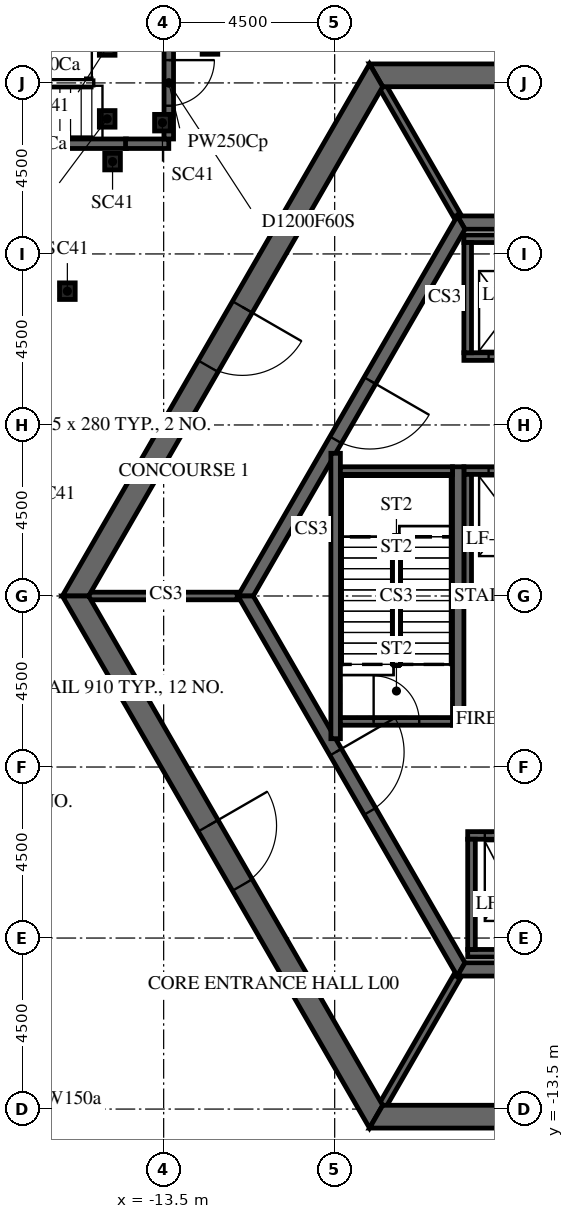
"""IFC4 building model, lengths in metres.
Left out: names, types, materials, properties, quantities, classifications, styles, units other than length and angle.
Written with IfcOpenShell. Run it as: python <this file> out.ifc"""

import sys

from ifc_helpers import new_model, si_unit, direction, frame, frame_2d, origin, origin_2d, place, context, subcontext, project, spatial, polyline, rectangle, i_section, outline, extrude, element, fill, save


model = new_model("IFC4")
c1 = context("Model", 3, precision=1e-05, world=origin(), true_north=direction((0.0, 1.0)))
c2 = subcontext(c1, "Body", "Model", "MODEL_VIEW")
j1 = project(units=[si_unit("LENGTHUNIT", "METRE"), si_unit("PLANEANGLEUNIT", "RADIAN")], contexts=[c1])
p1 = place(None, origin())
s1 = spatial("IfcSite", under=j1, at=p1, CompositionType="ELEMENT")
p2 = place(p1, origin())
s2 = spatial("IfcBuilding", under=s1, at=p2, CompositionType="ELEMENT")
p3 = place(p2, origin())
s3 = spatial("IfcBuildingStorey", under=s2, at=p3, CompositionType="ELEMENT", Elevation=0.0)
for number, where, z_axis, x_axis in (
    (1, (-16.034, 8.021, -2.1), (0.0, 0.0, 1.0), (1.0, 0.0, 0.0)),
    (2, (-12.282, 14.473, -2.1), (0.0, 0.0, 1.0), (1.0, 0.0, 0.0)),
    (3, (-14.986, 14.446, -2.1), (0.0, 0.0, 1.0), (1.0, 0.0, 0.0)),
    (4, (-14.986, 12.554, -2.1), (0.0, 0.0, 1.0), (1.0, 0.0, 0.0)),
    (5, (-13.532, 12.454, -2.1), (0.0, 0.0, 1.0), (1.0, 0.0, 0.0)),
    (6, (-14.845, 11.43, -2.1), (0.0, 0.0, 1.0), (1.0, 0.0, 0.0)),
):
    element("IfcColumn", number, at=place(p3, frame(where, z_axis=z_axis, x_axis=x_axis)), inside=s3, PredefinedType="COLUMN", context=c2, shape_type="SweptSolid", body=[
        extrude(i_section(OverallWidth=0.412, OverallDepth=0.437, WebThickness=0.036, FlangeThickness=0.058, FilletRadius=0.015, at=origin_2d()), origin(), (0.0, 0.0, 1.0), 10.85),
    ])
p4 = place(p3, frame((-7.91, 13.7, -2.1), z_axis=(0.0, 0.0, 1.0), x_axis=(-0.499999880136, -0.866025472988, 0.0)))
e7 = element("IfcWall", 7, at=p4, inside=s3, PredefinedType="SHEAR", context=c2, shape_type="SweptSolid", body=[
    extrude(outline(polyline([(-0.173, -0.3), (15.993, -0.3), (15.646, 0.3), (0.173, 0.3), (-0.173, -0.3)])), origin(), (0.0, 0.0, 1.0), 10.85),
])
p5 = place(p4, frame((7.039, 0.0, 2.1)))
e8 = element("IfcOpeningElement", 8, at=p5, cuts=e7, PredefinedType="OPENING", context=c2, shape_type="SweptSolid", body=[
    extrude(rectangle(XDim=1.8, YDim=2.4, at=frame_2d((0.9, 1.2))), frame((0.0, 0.31, 0.0), z_axis=(0.0, -1.0, 0.0), x_axis=(1.0, 0.0, 0.0)), (0.0, 0.0, 1.0), 0.62),
])
p6 = place(p3, frame((-15.819, 0.0, -2.1), z_axis=(0.0, 0.0, 1.0), x_axis=(0.499999880136, -0.866025472988, 0.0)))
e9 = element("IfcWall", 9, at=p6, inside=s3, PredefinedType="SHEAR", context=c2, shape_type="SweptSolid", body=[
    extrude(outline(polyline([(-0.173, -0.3), (15.993, -0.3), (15.646, 0.3), (0.173, 0.3), (-0.173, -0.3)])), origin(), (0.0, 0.0, 1.0), 10.85),
])
p7 = place(p6, frame((6.981, 0.0, 2.1)))
e10 = element("IfcOpeningElement", 10, at=p7, cuts=e9, PredefinedType="OPENING", context=c2, shape_type="SweptSolid", body=[
    extrude(rectangle(XDim=1.8, YDim=2.4, at=frame_2d((0.9, 1.2))), frame((0.0, 0.31, 0.0), z_axis=(0.0, -1.0, 0.0), x_axis=(1.0, 0.0, 0.0)), (0.0, 0.0, 1.0), 0.62),
])
p8 = place(p3, frame((-7.91, -13.7, -2.1), z_axis=(0.0, 0.0, 1.0), x_axis=(1.0, 0.0, 0.0)))
e11 = element("IfcWall", 11, at=p8, inside=s3, PredefinedType="SHEAR", context=c2, shape_type="SweptSolid", body=[
    extrude(outline(polyline([(-0.173, -0.3), (15.993, -0.3), (15.646, 0.3), (0.173, 0.3), (-0.173, -0.3)])), origin(), (0.0, 0.0, 1.0), 10.85),
])
p9 = place(p8, frame((7.31, 0.0, 2.1)))
e12 = element("IfcOpeningElement", 12, at=p9, cuts=e11, PredefinedType="OPENING", context=c2, shape_type="SweptSolid", body=[
    extrude(rectangle(XDim=1.2, YDim=2.4, at=frame_2d((0.6, 1.2))), frame((0.0, 0.31, 0.0), z_axis=(0.0, -1.0, 0.0), x_axis=(1.0, 0.0, 0.0)), (0.0, 0.0, 1.0), 0.62),
])
p10 = place(p3, frame((7.91, 13.7, -2.1), z_axis=(0.0, 0.0, 1.0), x_axis=(-1.0, 0.0, 0.0)))
e13 = element("IfcWall", 13, at=p10, inside=s3, PredefinedType="SHEAR", context=c2, shape_type="SweptSolid", body=[
    extrude(outline(polyline([(-0.173, -0.3), (15.993, -0.3), (15.646, 0.3), (0.173, 0.3), (-0.173, -0.3)])), origin(), (0.0, 0.0, 1.0), 10.85),
])
p11 = place(p10, frame((7.31, 0.0, 2.1)))
e14 = element("IfcOpeningElement", 14, at=p11, cuts=e13, PredefinedType="OPENING", context=c2, shape_type="SweptSolid", body=[
    extrude(rectangle(XDim=1.2, YDim=2.4, at=frame_2d((0.6, 1.2))), frame((0.0, 0.31, 0.0), z_axis=(0.0, -1.0, 0.0), x_axis=(1.0, 0.0, 0.0)), (0.0, 0.0, 1.0), 0.62),
])
p12 = place(p3, frame((-5.673, 9.825, -2.1), z_axis=(0.0, 0.0, 1.0), x_axis=(-0.499995046907, -0.866028263435, 0.0)))
e15 = element("IfcWall", 15, at=p12, inside=s3, PredefinedType="SHEAR", context=c2, shape_type="SweptSolid", body=[
    extrude(outline(polyline([(-0.101, -0.175), (11.446, -0.175), (11.244, 0.175), (0.101, 0.175), (-0.101, -0.175)])), origin(), (0.0, 0.0, 1.0), 10.85),
])
p13 = place(p12, frame((4.801, 0.0, 2.1)))
e16 = element("IfcOpeningElement", 16, at=p13, cuts=e15, PredefinedType="OPENING", context=c2, shape_type="SweptSolid", body=[
    extrude(rectangle(XDim=1.8, YDim=2.4, at=frame_2d((0.9, 1.2))), frame((0.0, 0.185, 0.0), z_axis=(0.0, -1.0, 0.0), x_axis=(1.0, 0.0, 0.0)), (0.0, 0.0, 1.0), 0.37),
])
p14 = place(p3, frame((-11.345, 0.0, -2.1), z_axis=(0.0, 0.0, 1.0), x_axis=(0.499995046907, -0.866028263435, 0.0)))
e17 = element("IfcWall", 17, at=p14, inside=s3, PredefinedType="SHEAR", context=c2, shape_type="SweptSolid", body=[
    extrude(outline(polyline([(-0.101, -0.175), (11.446, -0.175), (11.244, 0.175), (0.101, 0.175), (-0.101, -0.175)])), origin(), (0.0, 0.0, 1.0), 10.85),
])
p15 = place(p14, frame((4.744, 0.0, 2.1)))
e18 = element("IfcOpeningElement", 18, at=p15, cuts=e17, PredefinedType="OPENING", context=c2, shape_type="SweptSolid", body=[
    extrude(rectangle(XDim=1.8, YDim=2.4, at=frame_2d((0.9, 1.2))), frame((0.0, 0.185, 0.0), z_axis=(0.0, -1.0, 0.0), x_axis=(1.0, 0.0, 0.0)), (0.0, 0.0, 1.0), 0.37),
])
for number, where, z_axis, x_axis in (
    (19, (-5.673, -9.825, -2.1), (0.0, 0.0, 1.0), (1.0, 0.0, 0.0)),
    (20, (5.673, 9.825, -2.1), (0.0, 0.0, 1.0), (-1.0, 0.0, 0.0)),
):
    element("IfcWall", number, at=place(p3, frame(where, z_axis=z_axis, x_axis=x_axis)), inside=s3, PredefinedType="SHEAR", context=c2, shape_type="SweptSolid", body=[
        extrude(outline(polyline([(-0.101, -0.175), (11.446, -0.175), (11.244, 0.175), (0.101, 0.175), (-0.101, -0.175)])), origin(), (0.0, 0.0, 1.0), 10.85),
    ])
p16 = place(p3, frame((-5.6, 6.3, -2.1), z_axis=(0.0, 0.0, 1.0), x_axis=(1.0, 0.0, 0.0)))
e21 = element("IfcWall", 21, at=p16, inside=s3, PredefinedType="SHEAR", context=c2, shape_type="SweptSolid", body=[
    extrude(rectangle(XDim=11.2, YDim=0.2, at=frame_2d((5.6, 0.0))), origin(), (0.0, 0.0, 1.0), 10.85),
])
p17 = place(p16, frame((0.65, 0.0, 2.1)))
e22 = element("IfcOpeningElement", 22, at=p17, cuts=e21, PredefinedType="OPENING", context=c2, shape_type="SweptSolid", body=[
    extrude(rectangle(XDim=1.1, YDim=2.1, at=frame_2d((0.55, 1.05))), frame((0.0, 0.11, 0.0), z_axis=(0.0, -1.0, 0.0), x_axis=(1.0, 0.0, 0.0)), (0.0, 0.0, 1.0), 0.22),
])
p18 = place(p16, frame((2.85, 0.0, 2.1)))
e23 = element("IfcOpeningElement", 23, at=p18, cuts=e21, PredefinedType="OPENING", context=c2, shape_type="SweptSolid", body=[
    extrude(rectangle(XDim=1.1, YDim=2.1, at=frame_2d((0.55, 1.05))), frame((0.0, 0.11, 0.0), z_axis=(0.0, -1.0, 0.0), x_axis=(1.0, 0.0, 0.0)), (0.0, 0.0, 1.0), 0.22),
])
p19 = place(p16, frame((5.05, 0.0, 2.1)))
e24 = element("IfcOpeningElement", 24, at=p19, cuts=e21, PredefinedType="OPENING", context=c2, shape_type="SweptSolid", body=[
    extrude(rectangle(XDim=1.1, YDim=2.1, at=frame_2d((0.55, 1.05))), frame((0.0, 0.11, 0.0), z_axis=(0.0, -1.0, 0.0), x_axis=(1.0, 0.0, 0.0)), (0.0, 0.0, 1.0), 0.22),
])
p20 = place(p16, frame((7.25, 0.0, 2.1)))
e25 = element("IfcOpeningElement", 25, at=p20, cuts=e21, PredefinedType="OPENING", context=c2, shape_type="SweptSolid", body=[
    extrude(rectangle(XDim=1.1, YDim=2.1, at=frame_2d((0.55, 1.05))), frame((0.0, 0.11, 0.0), z_axis=(0.0, -1.0, 0.0), x_axis=(1.0, 0.0, 0.0)), (0.0, 0.0, 1.0), 0.22),
])
p21 = place(p16, frame((9.45, 0.0, 2.1)))
e26 = element("IfcOpeningElement", 26, at=p21, cuts=e21, PredefinedType="OPENING", context=c2, shape_type="SweptSolid", body=[
    extrude(rectangle(XDim=1.1, YDim=2.1, at=frame_2d((0.55, 1.05))), frame((0.0, 0.11, 0.0), z_axis=(0.0, -1.0, 0.0), x_axis=(1.0, 0.0, 0.0)), (0.0, 0.0, 1.0), 0.22),
])
p22 = place(p3, frame((-5.6, 9.4, -2.1), z_axis=(0.0, 0.0, 1.0), x_axis=(1.0, 0.0, 0.0)))
e27 = element("IfcWall", 27, at=p22, inside=s3, PredefinedType="SHEAR", context=c2, shape_type="SweptSolid", body=[
    extrude(rectangle(XDim=11.2, YDim=0.2, at=frame_2d((5.6, 0.0))), origin(), (0.0, 0.0, 1.0), 10.85),
])
p23 = place(p3, frame((-5.5, 6.4, -2.1), z_axis=(0.0, 0.0, 1.0), x_axis=(0.0, 1.0, 0.0)))
e28 = element("IfcWall", 28, at=p23, inside=s3, PredefinedType="SHEAR", context=c2, shape_type="SweptSolid", body=[
    extrude(rectangle(XDim=2.9, YDim=0.2, at=frame_2d((1.45, 0.0))), origin(), (0.0, 0.0, 1.0), 10.85),
])
p24 = place(p3, frame((-5.6, 3.3, -2.1), z_axis=(0.0, 0.0, 1.0), x_axis=(1.0, 0.0, 0.0)))
e29 = element("IfcWall", 29, at=p24, inside=s3, PredefinedType="SHEAR", context=c2, shape_type="SweptSolid", body=[
    extrude(rectangle(XDim=11.2, YDim=0.2, at=frame_2d((5.6, 0.0))), origin(), (0.0, 0.0, 1.0), 10.85),
])
p25 = place(p24, frame((0.65, 0.0, 2.1)))
e30 = element("IfcOpeningElement", 30, at=p25, cuts=e29, PredefinedType="OPENING", context=c2, shape_type="SweptSolid", body=[
    extrude(rectangle(XDim=1.1, YDim=2.1, at=frame_2d((0.55, 1.05))), frame((0.0, 0.11, 0.0), z_axis=(0.0, -1.0, 0.0), x_axis=(1.0, 0.0, 0.0)), (0.0, 0.0, 1.0), 0.22),
])
p26 = place(p24, frame((2.85, 0.0, 2.1)))
e31 = element("IfcOpeningElement", 31, at=p26, cuts=e29, PredefinedType="OPENING", context=c2, shape_type="SweptSolid", body=[
    extrude(rectangle(XDim=1.1, YDim=2.1, at=frame_2d((0.55, 1.05))), frame((0.0, 0.11, 0.0), z_axis=(0.0, -1.0, 0.0), x_axis=(1.0, 0.0, 0.0)), (0.0, 0.0, 1.0), 0.22),
])
p27 = place(p24, frame((5.05, 0.0, 2.1)))
e32 = element("IfcOpeningElement", 32, at=p27, cuts=e29, PredefinedType="OPENING", context=c2, shape_type="SweptSolid", body=[
    extrude(rectangle(XDim=1.1, YDim=2.1, at=frame_2d((0.55, 1.05))), frame((0.0, 0.11, 0.0), z_axis=(0.0, -1.0, 0.0), x_axis=(1.0, 0.0, 0.0)), (0.0, 0.0, 1.0), 0.22),
])
p28 = place(p24, frame((7.25, 0.0, 2.1)))
e33 = element("IfcOpeningElement", 33, at=p28, cuts=e29, PredefinedType="OPENING", context=c2, shape_type="SweptSolid", body=[
    extrude(rectangle(XDim=1.1, YDim=2.1, at=frame_2d((0.55, 1.05))), frame((0.0, 0.11, 0.0), z_axis=(0.0, -1.0, 0.0), x_axis=(1.0, 0.0, 0.0)), (0.0, 0.0, 1.0), 0.22),
])
p29 = place(p24, frame((9.45, 0.0, 2.1)))
e34 = element("IfcOpeningElement", 34, at=p29, cuts=e29, PredefinedType="OPENING", context=c2, shape_type="SweptSolid", body=[
    extrude(rectangle(XDim=1.1, YDim=2.1, at=frame_2d((0.55, 1.05))), frame((0.0, 0.11, 0.0), z_axis=(0.0, -1.0, 0.0), x_axis=(1.0, 0.0, 0.0)), (0.0, 0.0, 1.0), 0.22),
])
p30 = place(p3, frame((-5.6, 0.0, -2.1), z_axis=(0.0, 0.0, 1.0), x_axis=(1.0, 0.0, 0.0)))
e35 = element("IfcWall", 35, at=p30, inside=s3, PredefinedType="SHEAR", context=c2, shape_type="SweptSolid", body=[
    extrude(rectangle(XDim=11.2, YDim=0.2, at=frame_2d((5.6, 0.0))), origin(), (0.0, 0.0, 1.0), 10.85),
])
p31 = place(p3, frame((-5.5, 0.1, -2.1), z_axis=(0.0, 0.0, 1.0), x_axis=(0.0, 1.0, 0.0)))
e36 = element("IfcWall", 36, at=p31, inside=s3, PredefinedType="SHEAR", context=c2, shape_type="SweptSolid", body=[
    extrude(rectangle(XDim=3.1, YDim=0.2, at=frame_2d((1.55, 0.0))), origin(), (0.0, 0.0, 1.0), 10.85),
])
p32 = place(p3, frame((-5.5, -6.3, -2.1), z_axis=(0.0, 0.0, 1.0), x_axis=(1.0, 0.0, 0.0)))
e37 = element("IfcWall", 37, at=p32, inside=s3, PredefinedType="SHEAR", context=c2, shape_type="SweptSolid", body=[
    extrude(rectangle(XDim=9.2, YDim=0.2, at=frame_2d((4.6, 0.0))), origin(), (0.0, 0.0, 1.0), 10.85),
])
p33 = place(p32, frame((0.45, 0.0, 2.1)))
e38 = element("IfcOpeningElement", 38, at=p33, cuts=e37, PredefinedType="OPENING", context=c2, shape_type="SweptSolid", body=[
    extrude(rectangle(XDim=1.1, YDim=2.1, at=frame_2d((0.55, 1.05))), frame((0.0, 0.11, 0.0), z_axis=(0.0, -1.0, 0.0), x_axis=(1.0, 0.0, 0.0)), (0.0, 0.0, 1.0), 0.22),
])
p34 = place(p32, frame((2.25, 0.0, 2.1)))
e39 = element("IfcOpeningElement", 39, at=p34, cuts=e37, PredefinedType="OPENING", context=c2, shape_type="SweptSolid", body=[
    extrude(rectangle(XDim=1.1, YDim=2.1, at=frame_2d((0.55, 1.05))), frame((0.0, 0.11, 0.0), z_axis=(0.0, -1.0, 0.0), x_axis=(1.0, 0.0, 0.0)), (0.0, 0.0, 1.0), 0.22),
])
p35 = place(p32, frame((4.05, 0.0, 2.1)))
e40 = element("IfcOpeningElement", 40, at=p35, cuts=e37, PredefinedType="OPENING", context=c2, shape_type="SweptSolid", body=[
    extrude(rectangle(XDim=1.1, YDim=2.1, at=frame_2d((0.55, 1.05))), frame((0.0, 0.11, 0.0), z_axis=(0.0, -1.0, 0.0), x_axis=(1.0, 0.0, 0.0)), (0.0, 0.0, 1.0), 0.22),
])
p36 = place(p32, frame((5.85, 0.0, 2.1)))
e41 = element("IfcOpeningElement", 41, at=p36, cuts=e37, PredefinedType="OPENING", context=c2, shape_type="SweptSolid", body=[
    extrude(rectangle(XDim=1.1, YDim=2.1, at=frame_2d((0.55, 1.05))), frame((0.0, 0.11, 0.0), z_axis=(0.0, -1.0, 0.0), x_axis=(1.0, 0.0, 0.0)), (0.0, 0.0, 1.0), 0.22),
])
p37 = place(p32, frame((7.65, 0.0, 2.1)))
e42 = element("IfcOpeningElement", 42, at=p37, cuts=e37, PredefinedType="OPENING", context=c2, shape_type="SweptSolid", body=[
    extrude(rectangle(XDim=1.1, YDim=2.1, at=frame_2d((0.55, 1.05))), frame((0.0, 0.11, 0.0), z_axis=(0.0, -1.0, 0.0), x_axis=(1.0, 0.0, 0.0)), (0.0, 0.0, 1.0), 0.22),
])
p38 = place(p3, frame((-5.5, -9.4, -2.1), z_axis=(0.0, 0.0, 1.0), x_axis=(1.0, 0.0, 0.0)))
e43 = element("IfcWall", 43, at=p38, inside=s3, PredefinedType="SHEAR", context=c2, shape_type="SweptSolid", body=[
    extrude(rectangle(XDim=9.2, YDim=0.2, at=frame_2d((4.6, 0.0))), origin(), (0.0, 0.0, 1.0), 10.85),
])
p39 = place(p3, frame((-5.4, -9.3, -2.1), z_axis=(0.0, 0.0, 1.0), x_axis=(0.0, 1.0, 0.0)))
e44 = element("IfcWall", 44, at=p39, inside=s3, PredefinedType="SHEAR", context=c2, shape_type="SweptSolid", body=[
    extrude(rectangle(XDim=2.9, YDim=0.2, at=frame_2d((1.45, 0.0))), origin(), (0.0, 0.0, 1.0), 10.85),
])
p40 = place(p3, frame((-5.773, 10.0, -2.1), z_axis=(0.0, 0.0, 1.0), x_axis=(-0.500038251005, 0.86600331843, 0.0)))
e45 = element("IfcWall", 45, at=p40, inside=s3, PredefinedType="SHEAR", context=c2, shape_type="SweptSolid", body=[
    extrude(rectangle(XDim=3.926, YDim=0.2, at=frame_2d((1.963, 0.0))), origin(), (0.0, 0.0, 1.0), 10.85),
])
p41 = place(p3, frame((-11.547, 0.0, -2.1), z_axis=(0.0, 0.0, 1.0), x_axis=(-1.0, 0.0, 0.0)))
e46 = element("IfcWall", 46, at=p41, inside=s3, PredefinedType="SHEAR", context=c2, shape_type="SweptSolid", body=[
    extrude(rectangle(XDim=3.926, YDim=0.2, at=frame_2d((1.963, 0.0))), origin(), (0.0, 0.0, 1.0), 10.85),
])
p42 = place(p3, frame((-5.773, -10.0, -2.1), z_axis=(0.0, 0.0, 1.0), x_axis=(-0.500038251005, -0.86600331843, 0.0)))
e47 = element("IfcWall", 47, at=p42, inside=s3, PredefinedType="SHEAR", context=c2, shape_type="SweptSolid", body=[
    extrude(rectangle(XDim=3.926, YDim=0.2, at=frame_2d((1.963, 0.0))), origin(), (0.0, 0.0, 1.0), 10.85),
])
p43 = place(p3, frame((-5.75, -3.4, -2.1), z_axis=(0.0, 0.0, 1.0), x_axis=(0.0, 1.0, 0.0)))
e48 = element("IfcWall", 48, at=p43, inside=s3, PredefinedType="SHEAR", context=c2, shape_type="SweptSolid", body=[
    extrude(rectangle(XDim=6.8, YDim=0.3, at=frame_2d((3.4, 0.0))), origin(), (0.0, 0.0, 1.0), 10.85),
])
p44 = place(p3, frame((-8.975, -3.755, -2.1), z_axis=(0.0, 0.0, 1.0), x_axis=(0.0, 1.0, 0.0)))
e49 = element("IfcWall", 49, at=p44, inside=s3, PredefinedType="SHEAR", context=c2, shape_type="SweptSolid", body=[
    extrude(rectangle(XDim=7.51, YDim=0.25, at=frame_2d((3.755, 0.0))), origin(), (0.0, 0.0, 1.0), 10.85),
])
p45 = place(p3, frame((-8.85, 3.3, -2.1), z_axis=(0.0, 0.0, 1.0), x_axis=(1.0, 0.0, 0.0)))
e50 = element("IfcWall", 50, at=p45, inside=s3, PredefinedType="SHEAR", context=c2, shape_type="SweptSolid", body=[
    extrude(rectangle(XDim=2.95, YDim=0.2, at=frame_2d((1.475, 0.0))), origin(), (0.0, 0.0, 1.0), 10.85),
])
p46 = place(p3, frame((-8.85, -3.3, -2.1), z_axis=(0.0, 0.0, 1.0), x_axis=(1.0, 0.0, 0.0)))
e51 = element("IfcWall", 51, at=p46, inside=s3, PredefinedType="SHEAR", context=c2, shape_type="SweptSolid", body=[
    extrude(rectangle(XDim=2.95, YDim=0.2, at=frame_2d((1.475, 0.0))), origin(), (0.0, 0.0, 1.0), 10.85),
])
p47 = place(p46, frame((0.875, 0.0, 2.1)))
e52 = element("IfcOpeningElement", 52, at=p47, cuts=e51, PredefinedType="OPENING", context=c2, shape_type="SweptSolid", body=[
    extrude(rectangle(XDim=1.2, YDim=2.4, at=frame_2d((0.6, 1.2))), frame((0.0, 0.11, 0.0), z_axis=(0.0, -1.0, 0.0), x_axis=(1.0, 0.0, 0.0)), (0.0, 0.0, 1.0), 0.22),
])
p48 = place(p3, frame((-15.519, -19.12, 0.0), z_axis=(0.0, 0.0, 1.0), x_axis=(-0.49998639067, 0.866033260992, 0.0)))
e53 = element("IfcWall", 53, at=p48, inside=s3, PredefinedType="PARTITIONING", context=c2, shape_type="SweptSolid", body=[
    extrude(rectangle(XDim=7.767, YDim=0.15, at=frame_2d((3.883, 0.0))), origin(), (0.0, 0.0, 1.0), 8.75),
])
p49 = place(p48, frame((2.983, 0.0, 0.0)))
e54 = element("IfcOpeningElement", 54, at=p49, cuts=e53, PredefinedType="OPENING", context=c2, shape_type="SweptSolid", body=[
    extrude(rectangle(XDim=1.8, YDim=2.1, at=frame_2d((0.9, 1.05))), frame((0.0, 0.085, 0.0), z_axis=(0.0, -1.0, 0.0), x_axis=(1.0, 0.0, 0.0)), (0.0, 0.0, 1.0), 0.17),
])
p50 = place(p3, frame((-14.481, 11.9, 0.0), z_axis=(0.0, 0.0, 1.0), x_axis=(-1.0, 0.0, 0.0)))
e55 = element("IfcWall", 55, at=p50, inside=s3, PredefinedType="PARTITIONING", context=c2, shape_type="SweptSolid", body=[
    extrude(rectangle(XDim=5.219, YDim=0.25, at=frame_2d((2.609, 0.0))), origin(), (0.0, 0.0, 1.0), 8.75),
])
p51 = place(p3, frame((-13.365, 11.9, 0.0), z_axis=(0.0, 0.0, 1.0), x_axis=(-1.0, 0.0, 0.0)))
e56 = element("IfcWall", 56, at=p51, inside=s3, PredefinedType="PARTITIONING", context=c2, shape_type="SweptSolid", body=[
    extrude(rectangle(XDim=1.138, YDim=0.25, at=frame_2d((0.569, 0.0))), origin(), (0.0, 0.0, 1.0), 8.75),
])
p52 = place(p3, frame((-13.365, 14.975, 0.0), z_axis=(0.0, 0.0, 1.0), x_axis=(0.0, -1.0, 0.0)))
e57 = element("IfcWall", 57, at=p52, inside=s3, PredefinedType="PARTITIONING", context=c2, shape_type="SweptSolid", body=[
    extrude(rectangle(XDim=2.95, YDim=0.25, at=frame_2d((1.475, 0.0))), origin(), (0.0, 0.0, 1.0), 8.297),
])
p53 = place(p52, frame((0.875, 0.0, 0.0)))
e58 = element("IfcOpeningElement", 58, at=p53, cuts=e57, PredefinedType="OPENING", context=c2, shape_type="SweptSolid", body=[
    extrude(rectangle(XDim=1.2, YDim=2.1, at=frame_2d((0.6, 1.05))), frame((0.0, 0.135, 0.0), z_axis=(0.0, -1.0, 0.0), x_axis=(1.0, 0.0, 0.0)), (0.0, 0.0, 1.0), 0.27),
])
p54 = place(p5, origin())
e59 = element("IfcDoor", 59, at=p54, inside=s3, OperationType="DOUBLE_DOOR_SINGLE_SWING", PredefinedType="DOOR", context=c2, shape_type="SweptSolid", body=[
    extrude(rectangle(XDim=1.8, YDim=2.4, at=frame_2d((0.9, 1.2))), frame((0.0, 0.025, 0.0), z_axis=(0.0, -1.0, 0.0), x_axis=(1.0, 0.0, 0.0)), (0.0, 0.0, 1.0), 0.05),
])
fill(e8, e59)
p55 = place(p7, origin())
e60 = element("IfcDoor", 60, at=p55, inside=s3, OperationType="DOUBLE_DOOR_SINGLE_SWING", PredefinedType="DOOR", context=c2, shape_type="SweptSolid", body=[
    extrude(rectangle(XDim=1.8, YDim=2.4, at=frame_2d((0.9, 1.2))), frame((0.0, 0.025, 0.0), z_axis=(0.0, -1.0, 0.0), x_axis=(1.0, 0.0, 0.0)), (0.0, 0.0, 1.0), 0.05),
])
fill(e10, e60)
p56 = place(p13, origin())
e61 = element("IfcDoor", 61, at=p56, inside=s3, OperationType="DOUBLE_DOOR_SINGLE_SWING", PredefinedType="DOOR", context=c2, shape_type="SweptSolid", body=[
    extrude(rectangle(XDim=1.8, YDim=2.4, at=frame_2d((0.9, 1.2))), frame((0.0, 0.025, 0.0), z_axis=(0.0, -1.0, 0.0), x_axis=(1.0, 0.0, 0.0)), (0.0, 0.0, 1.0), 0.05),
])
fill(e16, e61)
p57 = place(p15, origin())
e62 = element("IfcDoor", 62, at=p57, inside=s3, OperationType="DOUBLE_DOOR_SINGLE_SWING", PredefinedType="DOOR", context=c2, shape_type="SweptSolid", body=[
    extrude(rectangle(XDim=1.8, YDim=2.4, at=frame_2d((0.9, 1.2))), frame((0.0, 0.025, 0.0), z_axis=(0.0, -1.0, 0.0), x_axis=(1.0, 0.0, 0.0)), (0.0, 0.0, 1.0), 0.05),
])
fill(e18, e62)
p58 = place(p47, origin())
e63 = element("IfcDoor", 63, at=p58, inside=s3, OperationType="SINGLE_SWING_LEFT", PredefinedType="DOOR", context=c2, shape_type="SweptSolid", body=[
    extrude(rectangle(XDim=1.2, YDim=2.4, at=frame_2d((0.6, 1.2))), frame((0.0, 0.025, 0.0), z_axis=(0.0, -1.0, 0.0), x_axis=(1.0, 0.0, 0.0)), (0.0, 0.0, 1.0), 0.05),
])
fill(e52, e63)
p59 = place(p17, origin())
e64 = element("IfcDoor", 64, at=p59, inside=s3, OperationType="SLIDING_TO_LEFT", PredefinedType="DOOR", context=c2, shape_type="SweptSolid", body=[
    extrude(rectangle(XDim=1.1, YDim=2.1, at=frame_2d((0.55, 1.05))), frame((0.0, 0.025, 0.0), z_axis=(0.0, -1.0, 0.0), x_axis=(1.0, 0.0, 0.0)), (0.0, 0.0, 1.0), 0.05),
])
fill(e22, e64)
p60 = place(p25, origin())
e65 = element("IfcDoor", 65, at=p60, inside=s3, OperationType="SLIDING_TO_LEFT", PredefinedType="DOOR", context=c2, shape_type="SweptSolid", body=[
    extrude(rectangle(XDim=1.1, YDim=2.1, at=frame_2d((0.55, 1.05))), frame((0.0, 0.025, 0.0), z_axis=(0.0, -1.0, 0.0), x_axis=(1.0, 0.0, 0.0)), (0.0, 0.0, 1.0), 0.05),
])
fill(e30, e65)
p61 = place(p33, origin())
e66 = element("IfcDoor", 66, at=p61, inside=s3, OperationType="SLIDING_TO_LEFT", PredefinedType="DOOR", context=c2, shape_type="SweptSolid", body=[
    extrude(rectangle(XDim=1.1, YDim=2.1, at=frame_2d((0.55, 1.05))), frame((0.0, 0.025, 0.0), z_axis=(0.0, -1.0, 0.0), x_axis=(1.0, 0.0, 0.0)), (0.0, 0.0, 1.0), 0.05),
])
fill(e38, e66)
p62 = place(p53, origin())
e67 = element("IfcDoor", 67, at=p62, inside=s3, OperationType="SINGLE_SWING_LEFT", PredefinedType="DOOR", context=c2, shape_type="SweptSolid", body=[
    extrude(rectangle(XDim=1.2, YDim=2.1, at=frame_2d((0.6, 1.05))), frame((0.0, 0.025, 0.0), z_axis=(0.0, -1.0, 0.0), x_axis=(1.0, 0.0, 0.0)), (0.0, 0.0, 1.0), 0.05),
])
fill(e58, e67)
save(model, sys.argv[1])
